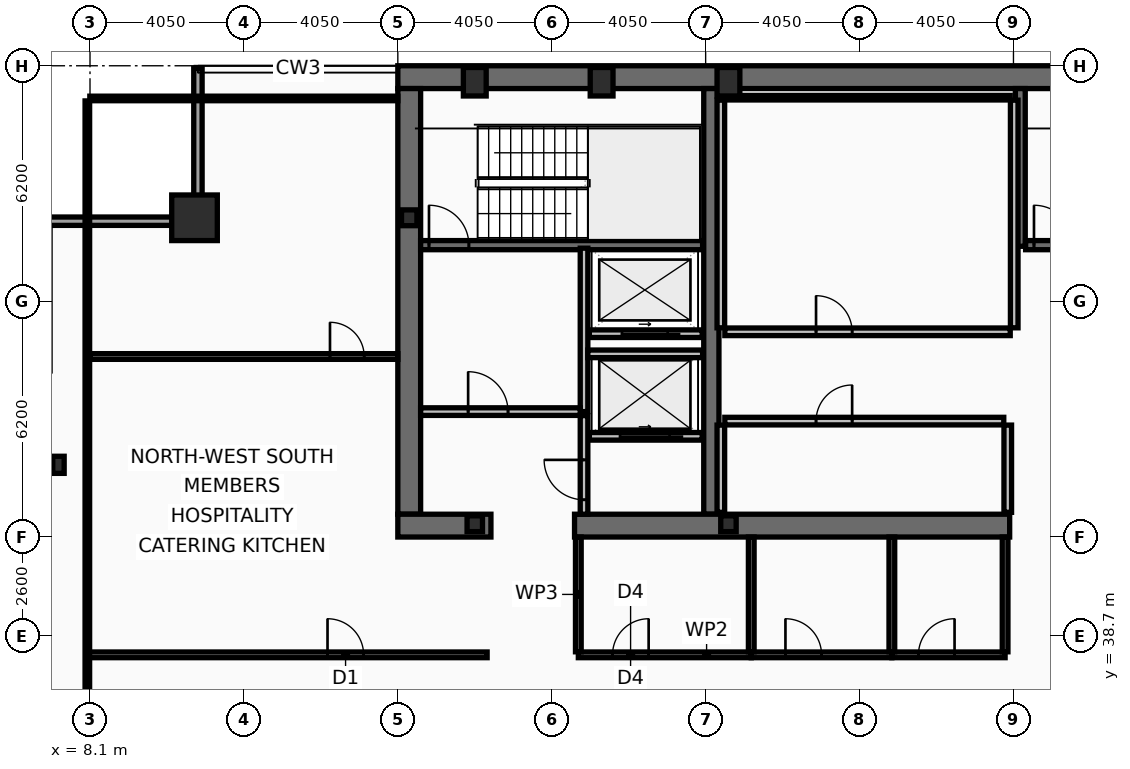
"""IFC4 building model, lengths in metres.
Left out: names, types, materials, properties, quantities, classifications, styles, units other than length and angle.
Written with IfcOpenShell. Run it as: python <this file> out.ifc"""

import sys

from ifc_helpers import new_model, si_unit, direction, frame, frame_2d, origin, origin_2d, place, context, subcontext, project, spatial, rectangle, hollow_rectangle, i_section, extrude, element, fill, save


model = new_model("IFC4")
c1 = context("Model", 3, precision=1e-05, world=origin(), true_north=direction((0.0, 1.0)))
c2 = subcontext(c1, "Body", "Model", "MODEL_VIEW")
j1 = project(units=[si_unit("LENGTHUNIT", "METRE"), si_unit("PLANEANGLEUNIT", "RADIAN")], contexts=[c1])
p1 = place(None, origin())
s1 = spatial("IfcSite", under=j1, at=p1, CompositionType="ELEMENT")
p2 = place(p1, origin())
s2 = spatial("IfcBuilding", under=s1, at=p2, CompositionType="ELEMENT")
p3 = place(p2, frame((0.0, 0.0, 213.8)))
s3 = spatial("IfcBuildingStorey", under=s2, at=p3, CompositionType="ELEMENT", Elevation=213.8)
p4 = place(p3, frame((16.2, 53.4, 0.0), z_axis=(0.0, 0.0, 1.0), x_axis=(1.0, 0.0, 0.0)))
e1 = element("IfcWall", 1, at=p4, inside=s3, PredefinedType="SHEAR", context=c2, shape_type="SweptSolid", body=[
    extrude(rectangle(XDim=40.5, YDim=0.6, at=frame_2d((20.25, 0.0))), origin(), (0.0, 0.0, 1.0), 3.44),
])
p5 = place(p3, frame((16.5, 41.9, 0.0), z_axis=(0.0, 0.0, 1.0), x_axis=(0.0, 1.0, 0.0)))
e2 = element("IfcWall", 2, at=p5, inside=s3, PredefinedType="SHEAR", context=c2, shape_type="SweptSolid", body=[
    extrude(rectangle(XDim=11.2, YDim=0.6, at=frame_2d((5.6, 0.0))), origin(), (0.0, 0.0, 1.0), 3.44),
])
p6 = place(p3, frame((24.45, 41.9, 0.0), z_axis=(0.0, 0.0, 1.0), x_axis=(0.0, 1.0, 0.0)))
e3 = element("IfcWall", 3, at=p6, inside=s3, PredefinedType="SHEAR", context=c2, shape_type="SweptSolid", body=[
    extrude(rectangle(XDim=11.2, YDim=0.4, at=frame_2d((5.6, 0.0))), origin(), (0.0, 0.0, 1.0), 3.44),
])
p7 = place(p3, frame((18.65, 41.6, 0.0), z_axis=(0.0, 0.0, 1.0), x_axis=(-1.0, 0.0, 0.0)))
e4 = element("IfcWall", 4, at=p7, inside=s3, PredefinedType="SHEAR", context=c2, shape_type="SweptSolid", body=[
    extrude(rectangle(XDim=2.45, YDim=0.6, at=frame_2d((1.225, 0.0))), origin(), (0.0, 0.0, 1.0), 3.44),
])
p8 = place(p3, frame((32.3, 41.6, 0.0), z_axis=(0.0, 0.0, 1.0), x_axis=(-1.0, 0.0, 0.0)))
e5 = element("IfcWall", 5, at=p8, inside=s3, PredefinedType="SHEAR", context=c2, shape_type="SweptSolid", body=[
    extrude(rectangle(XDim=11.45, YDim=0.6, at=frame_2d((5.725, 0.0))), origin(), (0.0, 0.0, 1.0), 3.44),
])
p9 = place(p3, frame((32.58, 48.95, 0.0), z_axis=(0.0, 0.0, 1.0), x_axis=(0.0, 1.0, 0.0)))
e6 = element("IfcWall", 6, at=p9, inside=s3, PredefinedType="SHEAR", context=c2, shape_type="SweptSolid", body=[
    extrude(rectangle(XDim=4.15, YDim=0.26, at=frame_2d((2.075, 0.0))), origin(), (0.0, 0.0, 1.0), 3.44),
])
p10 = place(p3, frame((16.8, 48.98, 0.0), z_axis=(0.0, 0.0, 1.0), x_axis=(1.0, 0.0, 0.0)))
e7 = element("IfcWall", 7, at=p10, inside=s3, PredefinedType="SHEAR", context=c2, shape_type="SweptSolid", body=[
    extrude(rectangle(XDim=7.42, YDim=0.24, at=frame_2d((3.71, 0.0))), origin(), (0.0, 0.0, 1.0), 3.44),
])
p11 = place(p10, frame((0.22, 0.0, 0.0)))
e8 = element("IfcOpeningElement", 8, at=p11, cuts=e7, PredefinedType="OPENING", context=c2, shape_type="SweptSolid", body=[
    extrude(rectangle(XDim=1.05, YDim=2.15, at=frame_2d((0.525, 1.075))), frame((0.0, 0.13, 0.0), z_axis=(0.0, -1.0, 0.0), x_axis=(1.0, 0.0, 0.0)), (0.0, 0.0, 1.0), 0.26),
])
p12 = place(p3, frame((32.72, 48.98, 0.0), z_axis=(0.0, 0.0, 1.0), x_axis=(1.0, 0.0, 0.0)))
e9 = element("IfcWall", 9, at=p12, inside=s3, PredefinedType="SHEAR", context=c2, shape_type="SweptSolid", body=[
    extrude(rectangle(XDim=7.56, YDim=0.24, at=frame_2d((3.78, 0.0))), origin(), (0.0, 0.0, 1.0), 3.44),
])
p13 = place(p12, frame((0.22, 0.0, 0.0)))
e10 = element("IfcOpeningElement", 10, at=p13, cuts=e9, PredefinedType="OPENING", context=c2, shape_type="SweptSolid", body=[
    extrude(rectangle(XDim=1.05, YDim=2.15, at=frame_2d((0.525, 1.075))), frame((0.0, 0.13, 0.0), z_axis=(0.0, -1.0, 0.0), x_axis=(1.0, 0.0, 0.0)), (0.0, 0.0, 1.0), 0.26),
])
p14 = place(p3, frame((10.85, 49.7, 0.0), z_axis=(0.0, 0.0, 1.0), x_axis=(1.0, 0.0, 0.0)))
e11 = element("IfcColumn", 11, at=p14, inside=s3, PredefinedType="COLUMN", context=c2, shape_type="SweptSolid", body=[
    extrude(hollow_rectangle(XDim=1.2, YDim=1.2, WallThickness=0.06, at=origin_2d()), origin(), (0.0, 0.0, 1.0), 3.6),
])
for number, where, z_axis, x_axis in (
    (12, (18.225, 53.28, 0.0), (0.0, 0.0, 1.0), (1.0, 0.0, 0.0)),
    (13, (21.562, 53.28, 0.0), (0.0, 0.0, 1.0), (1.0, 0.0, 0.0)),
    (14, (24.9, 53.28, 0.0), (0.0, 0.0, 1.0), (1.0, 0.0, 0.0)),
):
    element("IfcColumn", number, at=place(p3, frame(where, z_axis=z_axis, x_axis=x_axis)), inside=s3, PredefinedType="COLUMN", context=c2, shape_type="SweptSolid", body=[
        extrude(hollow_rectangle(XDim=0.6, YDim=0.75, WallThickness=0.045, at=origin_2d()), origin(), (0.0, 0.0, 1.0), 3.6),
    ])
p15 = place(p3, frame((7.27, 43.2, 0.0), z_axis=(0.0, 0.0, 1.0), x_axis=(1.0, 0.0, 0.0)))
e15 = element("IfcColumn", 15, at=p15, inside=s3, PredefinedType="COLUMN", context=c2, shape_type="SweptSolid", body=[
    extrude(i_section(OverallWidth=0.3, OverallDepth=0.45, WebThickness=0.014, FlangeThickness=0.026, at=origin_2d()), origin(), (0.0, 0.0, 1.0), 3.6),
])
for number, where, z_axis, x_axis in (
    (16, (16.5, 49.7, 0.0), (0.0, 0.0, 1.0), (1.0, 0.0, 0.0)),
    (17, (18.225, 41.65, 0.0), (0.0, 0.0, 1.0), (1.0, 0.0, 0.0)),
    (18, (24.9, 41.65, 0.0), (0.0, 0.0, 1.0), (1.0, 0.0, 0.0)),
):
    element("IfcColumn", number, at=place(p3, frame(where, z_axis=z_axis, x_axis=x_axis)), inside=s3, PredefinedType="COLUMN", context=c2, shape_type="SweptSolid", body=[
        extrude(i_section(OverallWidth=0.406, OverallDepth=0.416, WebThickness=0.03, FlangeThickness=0.048, at=origin_2d()), origin(), (0.0, 0.0, 1.0), 3.6),
    ])
p16 = place(p3, frame((6.83, 49.61, 0.0), z_axis=(0.0, 0.0, 1.0), x_axis=(1.0, 0.0, 0.0)))
e19 = element("IfcWall", 19, at=p16, inside=s3, PredefinedType="SOLIDWALL", context=c2, shape_type="SweptSolid", body=[
    extrude(rectangle(XDim=4.22, YDim=0.22, at=frame_2d((2.11, 0.0))), origin(), (0.0, 0.0, 1.0), 2.83),
])
p17 = place(p3, frame((10.94, 49.72, 0.0), z_axis=(0.0, 0.0, 1.0), x_axis=(0.0, 1.0, 0.0)))
e20 = element("IfcWall", 20, at=p17, inside=s3, PredefinedType="SOLIDWALL", context=c2, shape_type="SweptSolid", body=[
    extrude(rectangle(XDim=3.91, YDim=0.22, at=frame_2d((1.955, 0.0))), origin(), (0.0, 0.0, 1.0), 2.83),
])
p18 = place(p3, frame((24.21, 43.95, 0.0), z_axis=(0.0, 0.0, 1.0), x_axis=(-1.0, 0.0, 0.0)))
e21 = element("IfcWall", 21, at=p18, inside=s3, PredefinedType="PARTITIONING", context=c2, shape_type="SweptSolid", body=[
    extrude(rectangle(XDim=2.97, YDim=0.2, at=frame_2d((1.485, 0.0))), origin(), (0.0, 0.0, 1.0), 3.44),
])
p19 = place(p18, frame((0.86, 0.0, 0.0)))
e22 = element("IfcOpeningElement", 22, at=p19, cuts=e21, PredefinedType="OPENING", context=c2, shape_type="SweptSolid", body=[
    extrude(rectangle(XDim=1.3, YDim=2.18, at=frame_2d((0.65, 1.09))), frame((0.0, 0.11, 0.0), z_axis=(0.0, -1.0, 0.0), x_axis=(1.0, 0.0, 0.0)), (0.0, 0.0, 1.0), 0.22),
])
p20 = place(p3, frame((24.21, 46.65, 0.0), z_axis=(0.0, 0.0, 1.0), x_axis=(-1.0, 0.0, 0.0)))
e23 = element("IfcWall", 23, at=p20, inside=s3, PredefinedType="PARTITIONING", context=c2, shape_type="SweptSolid", body=[
    extrude(rectangle(XDim=2.97, YDim=0.2, at=frame_2d((1.485, 0.0))), origin(), (0.0, 0.0, 1.0), 3.44),
])
p21 = place(p20, frame((0.91, 0.0, 0.0)))
e24 = element("IfcOpeningElement", 24, at=p21, cuts=e23, PredefinedType="OPENING", context=c2, shape_type="SweptSolid", body=[
    extrude(rectangle(XDim=1.2, YDim=2.18, at=frame_2d((0.6, 1.09))), frame((0.0, 0.11, 0.0), z_axis=(0.0, -1.0, 0.0), x_axis=(1.0, 0.0, 0.0)), (0.0, 0.0, 1.0), 0.22),
])
p22 = place(p3, frame((21.1, 44.6, 0.0), z_axis=(0.0, 0.0, 1.0), x_axis=(0.0, 1.0, 0.0)))
e25 = element("IfcWall", 25, at=p22, inside=s3, PredefinedType="PARTITIONING", context=c2, shape_type="SweptSolid", body=[
    extrude(rectangle(XDim=4.3, YDim=0.2, at=frame_2d((2.15, 0.0))), origin(), (0.0, 0.0, 1.0), 3.44),
])
p23 = place(p3, frame((16.8, 44.6, 0.0), z_axis=(0.0, 0.0, 1.0), x_axis=(1.0, 0.0, 0.0)))
e26 = element("IfcWall", 26, at=p23, inside=s3, PredefinedType="PARTITIONING", context=c2, shape_type="SweptSolid", body=[
    extrude(rectangle(XDim=4.2, YDim=0.2, at=frame_2d((2.1, 0.0))), origin(), (0.0, 0.0, 1.0), 3.44),
])
p24 = place(p23, frame((1.25, 0.0, 0.0)))
e27 = element("IfcOpeningElement", 27, at=p24, cuts=e26, PredefinedType="OPENING", context=c2, shape_type="SweptSolid", body=[
    extrude(rectangle(XDim=1.05, YDim=2.15, at=frame_2d((0.525, 1.075))), frame((0.0, 0.11, 0.0), z_axis=(0.0, -1.0, 0.0), x_axis=(1.0, 0.0, 0.0)), (0.0, 0.0, 1.0), 0.22),
])
p25 = place(p3, frame((21.2, 46.12, 0.0), z_axis=(0.0, 0.0, 1.0), x_axis=(1.0, 0.0, 0.0)))
e28 = element("IfcWall", 28, at=p25, inside=s3, PredefinedType="PARTITIONING", context=c2, shape_type="SweptSolid", body=[
    extrude(rectangle(XDim=3.02, YDim=0.2, at=frame_2d((1.51, 0.0))), origin(), (0.0, 0.0, 1.0), 3.44),
])
p26 = place(p3, frame((21.1, 41.9, 0.0), z_axis=(0.0, 0.0, 1.0), x_axis=(0.0, 1.0, 0.0)))
e29 = element("IfcWall", 29, at=p26, inside=s3, PredefinedType="PARTITIONING", context=c2, shape_type="SweptSolid", body=[
    extrude(rectangle(XDim=2.595, YDim=0.2, at=frame_2d((1.298, 0.0))), origin(), (0.0, 0.0, 1.0), 3.44),
])
p27 = place(p26, frame((0.38, 0.0, 0.0)))
e30 = element("IfcOpeningElement", 30, at=p27, cuts=e29, PredefinedType="OPENING", context=c2, shape_type="SweptSolid", body=[
    extrude(rectangle(XDim=1.05, YDim=2.15, at=frame_2d((0.525, 1.075))), frame((0.0, 0.11, 0.0), z_axis=(0.0, -1.0, 0.0), x_axis=(1.0, 0.0, 0.0)), (0.0, 0.0, 1.0), 0.22),
])
for number, where, z_axis, x_axis in (
    (31, (24.7, 46.805, 0.0), (0.0, 0.0, 1.0), (0.0, 1.0, 0.0)),
    (32, (32.42, 46.805, 0.0), (0.0, 0.0, 1.0), (0.0, 1.0, 0.0)),
):
    element("IfcWall", number, at=place(p3, frame(where, z_axis=z_axis, x_axis=x_axis)), inside=s3, PredefinedType="PARTITIONING", context=c2, shape_type="SweptSolid", body=[
        extrude(rectangle(XDim=5.99, YDim=0.2, at=frame_2d((2.995, 0.0))), origin(), (0.0, 0.0, 1.0), 3.44),
    ])
p28 = place(p3, frame((24.805, 52.86, 0.0), z_axis=(0.0, 0.0, 1.0), x_axis=(1.0, 0.0, 0.0)))
e33 = element("IfcWall", 33, at=p28, inside=s3, PredefinedType="PARTITIONING", context=c2, shape_type="SweptSolid", body=[
    extrude(rectangle(XDim=7.51, YDim=0.12, at=frame_2d((3.755, 0.0))), origin(), (0.0, 0.0, 1.0), 3.44),
])
p29 = place(p3, frame((24.805, 46.7, 0.0), z_axis=(0.0, 0.0, 1.0), x_axis=(1.0, 0.0, 0.0)))
e34 = element("IfcWall", 34, at=p29, inside=s3, PredefinedType="PARTITIONING", context=c2, shape_type="SweptSolid", body=[
    extrude(rectangle(XDim=7.51, YDim=0.2, at=frame_2d((3.755, 0.0))), origin(), (0.0, 0.0, 1.0), 3.44),
])
p30 = place(p29, frame((2.4, 0.0, 0.0)))
e35 = element("IfcOpeningElement", 35, at=p30, cuts=e34, PredefinedType="OPENING", context=c2, shape_type="SweptSolid", body=[
    extrude(rectangle(XDim=0.95, YDim=2.1, at=frame_2d((0.475, 1.05))), frame((0.0, 0.11, 0.0), z_axis=(0.0, -1.0, 0.0), x_axis=(1.0, 0.0, 0.0)), (0.0, 0.0, 1.0), 0.22),
])
for number, where, z_axis, x_axis in (
    (36, (24.7, 41.95, 0.0), (0.0, 0.0, 1.0), (0.0, 1.0, 0.0)),
    (37, (32.25, 41.95, 0.0), (0.0, 0.0, 1.0), (0.0, 1.0, 0.0)),
):
    element("IfcWall", number, at=place(p3, frame(where, z_axis=z_axis, x_axis=x_axis)), inside=s3, PredefinedType="PARTITIONING", context=c2, shape_type="SweptSolid", body=[
        extrude(rectangle(XDim=2.295, YDim=0.2, at=frame_2d((1.147, 0.0))), origin(), (0.0, 0.0, 1.0), 3.44),
    ])
p31 = place(p3, frame((24.805, 44.35, 0.0), z_axis=(0.0, 0.0, 1.0), x_axis=(1.0, 0.0, 0.0)))
e38 = element("IfcWall", 38, at=p31, inside=s3, PredefinedType="PARTITIONING", context=c2, shape_type="SweptSolid", body=[
    extrude(rectangle(XDim=7.34, YDim=0.2, at=frame_2d((3.67, 0.0))), origin(), (0.0, 0.0, 1.0), 3.44),
])
p32 = place(p31, frame((2.4, 0.0, 0.0)))
e39 = element("IfcOpeningElement", 39, at=p32, cuts=e38, PredefinedType="OPENING", context=c2, shape_type="SweptSolid", body=[
    extrude(rectangle(XDim=0.95, YDim=2.1, at=frame_2d((0.475, 1.05))), frame((0.0, 0.11, 0.0), z_axis=(0.0, -1.0, 0.0), x_axis=(1.0, 0.0, 0.0)), (0.0, 0.0, 1.0), 0.22),
])
p33 = place(p3, frame((20.95, 38.2, 0.0), z_axis=(0.0, 0.0, 1.0), x_axis=(1.0, 0.0, 0.0)))
e40 = element("IfcWall", 40, at=p33, inside=s3, PredefinedType="PARTITIONING", context=c2, shape_type="SweptSolid", body=[
    extrude(rectangle(XDim=4.55, YDim=0.15, at=frame_2d((2.275, 0.0))), origin(), (0.0, 0.0, 1.0), 2.73),
])
p34 = place(p33, frame((0.9, 0.0, 0.0)))
e41 = element("IfcOpeningElement", 41, at=p34, cuts=e40, PredefinedType="OPENING", context=c2, shape_type="SweptSolid", body=[
    extrude(rectangle(XDim=0.95, YDim=2.05, at=frame_2d((0.475, 1.025))), frame((0.0, 0.085, 0.0), z_axis=(0.0, -1.0, 0.0), x_axis=(1.0, 0.0, 0.0)), (0.0, 0.0, 1.0), 0.17),
])
p35 = place(p3, frame((25.5, 38.2, 0.0), z_axis=(0.0, 0.0, 1.0), x_axis=(1.0, 0.0, 0.0)))
e42 = element("IfcWall", 42, at=p35, inside=s3, PredefinedType="PARTITIONING", context=c2, shape_type="SweptSolid", body=[
    extrude(rectangle(XDim=3.7, YDim=0.15, at=frame_2d((1.85, 0.0))), origin(), (0.0, 0.0, 1.0), 3.44),
])
p36 = place(p35, frame((0.9, 0.0, 0.0)))
e43 = element("IfcOpeningElement", 43, at=p36, cuts=e42, PredefinedType="OPENING", context=c2, shape_type="SweptSolid", body=[
    extrude(rectangle(XDim=0.95, YDim=2.05, at=frame_2d((0.475, 1.025))), frame((0.0, 0.085, 0.0), z_axis=(0.0, -1.0, 0.0), x_axis=(1.0, 0.0, 0.0)), (0.0, 0.0, 1.0), 0.17),
])
p37 = place(p3, frame((29.2, 38.2, 0.0), z_axis=(0.0, 0.0, 1.0), x_axis=(1.0, 0.0, 0.0)))
e44 = element("IfcWall", 44, at=p37, inside=s3, PredefinedType="PARTITIONING", context=c2, shape_type="SweptSolid", body=[
    extrude(rectangle(XDim=2.98, YDim=0.15, at=frame_2d((1.49, 0.0))), origin(), (0.0, 0.0, 1.0), 2.73),
])
p38 = place(p37, frame((0.7, 0.0, 0.0)))
e45 = element("IfcOpeningElement", 45, at=p38, cuts=e44, PredefinedType="OPENING", context=c2, shape_type="SweptSolid", body=[
    extrude(rectangle(XDim=0.95, YDim=2.05, at=frame_2d((0.475, 1.025))), frame((0.0, 0.085, 0.0), z_axis=(0.0, -1.0, 0.0), x_axis=(1.0, 0.0, 0.0)), (0.0, 0.0, 1.0), 0.17),
])
for number, where, z_axis, x_axis in (
    (46, (20.95, 38.28, 0.0), (0.0, 0.0, 1.0), (0.0, 1.0, 0.0)),
    (47, (25.5, 38.28, 0.0), (0.0, 0.0, 1.0), (0.0, 1.0, 0.0)),
    (48, (29.2, 38.28, 0.0), (0.0, 0.0, 1.0), (0.0, 1.0, 0.0)),
    (49, (32.18, 38.28, 0.0), (0.0, 0.0, 1.0), (0.0, 1.0, 0.0)),
):
    element("IfcWall", number, at=place(p3, frame(where, z_axis=z_axis, x_axis=x_axis)), inside=s3, PredefinedType="PARTITIONING", context=c2, shape_type="SweptSolid", body=[
        extrude(rectangle(XDim=3.02, YDim=0.15, at=frame_2d((1.51, 0.0))), origin(), (0.0, 0.0, 1.0), 3.44),
    ])
p39 = place(p3, frame((8.03, 38.2, 0.0), z_axis=(0.0, 0.0, 1.0), x_axis=(1.0, 0.0, 0.0)))
e50 = element("IfcWall", 50, at=p39, inside=s3, PredefinedType="PARTITIONING", context=c2, shape_type="SweptSolid", body=[
    extrude(rectangle(XDim=10.52, YDim=0.15, at=frame_2d((5.26, 0.0))), origin(), (0.0, 0.0, 1.0), 2.73),
])
p40 = place(p39, frame((6.32, 0.0, 0.0)))
e51 = element("IfcOpeningElement", 51, at=p40, cuts=e50, PredefinedType="OPENING", context=c2, shape_type="SweptSolid", body=[
    extrude(rectangle(XDim=0.95, YDim=2.05, at=frame_2d((0.475, 1.025))), frame((0.0, 0.085, 0.0), z_axis=(0.0, -1.0, 0.0), x_axis=(1.0, 0.0, 0.0)), (0.0, 0.0, 1.0), 0.17),
])
p41 = place(p3, frame((8.095, 46.05, 0.0), z_axis=(0.0, 0.0, 1.0), x_axis=(1.0, 0.0, 0.0)))
e52 = element("IfcWall", 52, at=p41, inside=s3, PredefinedType="PARTITIONING", context=c2, shape_type="SweptSolid", body=[
    extrude(rectangle(XDim=8.105, YDim=0.15, at=frame_2d((4.052, 0.0))), origin(), (0.0, 0.0, 1.0), 2.83),
])
p42 = place(p41, frame((6.32, 0.0, 0.0)))
e53 = element("IfcOpeningElement", 53, at=p42, cuts=e52, PredefinedType="OPENING", context=c2, shape_type="SweptSolid", body=[
    extrude(rectangle(XDim=0.9, YDim=2.05, at=frame_2d((0.45, 1.025))), frame((0.0, 0.085, 0.0), z_axis=(0.0, -1.0, 0.0), x_axis=(1.0, 0.0, 0.0)), (0.0, 0.0, 1.0), 0.17),
])
p43 = place(p3, frame((8.03, 10.665, 0.0), z_axis=(0.0, 0.0, 1.0), x_axis=(0.0, 1.0, 0.0)))
e54 = element("IfcWall", 54, at=p43, inside=s3, PredefinedType="PARTITIONING", context=c2, shape_type="SweptSolid", body=[
    extrude(rectangle(XDim=42.11, YDim=0.12, at=frame_2d((21.055, 0.0))), origin(), (0.0, 0.0, 1.0), 2.73),
])
p44 = place(p3, frame((8.095, 52.84, 0.0), z_axis=(0.0, 0.0, 1.0), x_axis=(1.0, 0.0, 0.0)))
e55 = element("IfcWall", 55, at=p44, inside=s3, PredefinedType="PARTITIONING", context=c2, shape_type="SweptSolid", body=[
    extrude(rectangle(XDim=8.105, YDim=0.12, at=frame_2d((4.052, 0.0))), origin(), (0.0, 0.0, 1.0), 3.44),
])
p45 = place(p11, origin())
e56 = element("IfcDoor", 56, at=p45, inside=s3, OperationType="SINGLE_SWING_LEFT", PredefinedType="DOOR", context=c2, shape_type="SweptSolid", body=[
    extrude(rectangle(XDim=1.05, YDim=2.15, at=frame_2d((0.525, 1.075))), frame((0.0, 0.025, 0.0), z_axis=(0.0, -1.0, 0.0), x_axis=(1.0, 0.0, 0.0)), (0.0, 0.0, 1.0), 0.05),
])
fill(e8, e56)
p46 = place(p13, origin())
e57 = element("IfcDoor", 57, at=p46, inside=s3, OperationType="SINGLE_SWING_LEFT", PredefinedType="DOOR", context=c2, shape_type="SweptSolid", body=[
    extrude(rectangle(XDim=1.05, YDim=2.15, at=frame_2d((0.525, 1.075))), frame((0.0, 0.025, 0.0), z_axis=(0.0, -1.0, 0.0), x_axis=(1.0, 0.0, 0.0)), (0.0, 0.0, 1.0), 0.05),
])
fill(e10, e57)
p47 = place(p19, origin())
e58 = element("IfcDoor", 58, at=p47, inside=s3, OperationType="SLIDING_TO_LEFT", PredefinedType="DOOR", context=c2, shape_type="SweptSolid", body=[
    extrude(rectangle(XDim=1.3, YDim=2.18, at=frame_2d((0.65, 1.09))), frame((0.0, 0.025, 0.0), z_axis=(0.0, -1.0, 0.0), x_axis=(1.0, 0.0, 0.0)), (0.0, 0.0, 1.0), 0.05),
])
fill(e22, e58)
p48 = place(p21, origin())
e59 = element("IfcDoor", 59, at=p48, inside=s3, OperationType="SLIDING_TO_LEFT", PredefinedType="DOOR", context=c2, shape_type="SweptSolid", body=[
    extrude(rectangle(XDim=1.2, YDim=2.18, at=frame_2d((0.6, 1.09))), frame((0.0, 0.025, 0.0), z_axis=(0.0, -1.0, 0.0), x_axis=(1.0, 0.0, 0.0)), (0.0, 0.0, 1.0), 0.05),
])
fill(e24, e59)
p49 = place(p24, origin())
e60 = element("IfcDoor", 60, at=p49, inside=s3, OperationType="SINGLE_SWING_LEFT", PredefinedType="DOOR", context=c2, shape_type="SweptSolid", body=[
    extrude(rectangle(XDim=1.05, YDim=2.15, at=frame_2d((0.525, 1.075))), frame((0.0, 0.025, 0.0), z_axis=(0.0, -1.0, 0.0), x_axis=(1.0, 0.0, 0.0)), (0.0, 0.0, 1.0), 0.05),
])
fill(e27, e60)
p50 = place(p27, origin())
e61 = element("IfcDoor", 61, at=p50, inside=s3, OperationType="SINGLE_SWING_RIGHT", PredefinedType="DOOR", context=c2, shape_type="SweptSolid", body=[
    extrude(rectangle(XDim=1.05, YDim=2.15, at=frame_2d((0.525, 1.075))), frame((0.0, 0.025, 0.0), z_axis=(0.0, -1.0, 0.0), x_axis=(1.0, 0.0, 0.0)), (0.0, 0.0, 1.0), 0.05),
])
fill(e30, e61)
p51 = place(p30, origin())
e62 = element("IfcDoor", 62, at=p51, inside=s3, OperationType="SINGLE_SWING_LEFT", PredefinedType="DOOR", context=c2, shape_type="SweptSolid", body=[
    extrude(rectangle(XDim=0.95, YDim=2.1, at=frame_2d((0.475, 1.05))), frame((0.0, 0.025, 0.0), z_axis=(0.0, -1.0, 0.0), x_axis=(1.0, 0.0, 0.0)), (0.0, 0.0, 1.0), 0.05),
])
fill(e35, e62)
p52 = place(p32, origin())
e63 = element("IfcDoor", 63, at=p52, inside=s3, OperationType="SINGLE_SWING_RIGHT", PredefinedType="DOOR", context=c2, shape_type="SweptSolid", body=[
    extrude(rectangle(XDim=0.95, YDim=2.1, at=frame_2d((0.475, 1.05))), frame((0.0, 0.025, 0.0), z_axis=(0.0, -1.0, 0.0), x_axis=(1.0, 0.0, 0.0)), (0.0, 0.0, 1.0), 0.05),
])
fill(e39, e63)
p53 = place(p34, origin())
e64 = element("IfcDoor", 64, at=p53, inside=s3, OperationType="SINGLE_SWING_RIGHT", PredefinedType="DOOR", context=c2, shape_type="SweptSolid", body=[
    extrude(rectangle(XDim=0.95, YDim=2.05, at=frame_2d((0.475, 1.025))), frame((0.0, 0.025, 0.0), z_axis=(0.0, -1.0, 0.0), x_axis=(1.0, 0.0, 0.0)), (0.0, 0.0, 1.0), 0.05),
])
fill(e41, e64)
p54 = place(p36, origin())
e65 = element("IfcDoor", 65, at=p54, inside=s3, OperationType="SINGLE_SWING_LEFT", PredefinedType="DOOR", context=c2, shape_type="SweptSolid", body=[
    extrude(rectangle(XDim=0.95, YDim=2.05, at=frame_2d((0.475, 1.025))), frame((0.0, 0.025, 0.0), z_axis=(0.0, -1.0, 0.0), x_axis=(1.0, 0.0, 0.0)), (0.0, 0.0, 1.0), 0.05),
])
fill(e43, e65)
p55 = place(p38, origin())
e66 = element("IfcDoor", 66, at=p55, inside=s3, OperationType="SINGLE_SWING_RIGHT", PredefinedType="DOOR", context=c2, shape_type="SweptSolid", body=[
    extrude(rectangle(XDim=0.95, YDim=2.05, at=frame_2d((0.475, 1.025))), frame((0.0, 0.025, 0.0), z_axis=(0.0, -1.0, 0.0), x_axis=(1.0, 0.0, 0.0)), (0.0, 0.0, 1.0), 0.05),
])
fill(e45, e66)
p56 = place(p40, origin())
e67 = element("IfcDoor", 67, at=p56, inside=s3, OperationType="SINGLE_SWING_LEFT", PredefinedType="DOOR", context=c2, shape_type="SweptSolid", body=[
    extrude(rectangle(XDim=0.95, YDim=2.05, at=frame_2d((0.475, 1.025))), frame((0.0, 0.025, 0.0), z_axis=(0.0, -1.0, 0.0), x_axis=(1.0, 0.0, 0.0)), (0.0, 0.0, 1.0), 0.05),
])
fill(e51, e67)
p57 = place(p42, origin())
e68 = element("IfcDoor", 68, at=p57, inside=s3, OperationType="SINGLE_SWING_LEFT", PredefinedType="DOOR", context=c2, shape_type="SweptSolid", body=[
    extrude(rectangle(XDim=0.9, YDim=2.05, at=frame_2d((0.45, 1.025))), frame((0.0, 0.025, 0.0), z_axis=(0.0, -1.0, 0.0), x_axis=(1.0, 0.0, 0.0)), (0.0, 0.0, 1.0), 0.05),
])
fill(e53, e68)
save(model, sys.argv[1])
